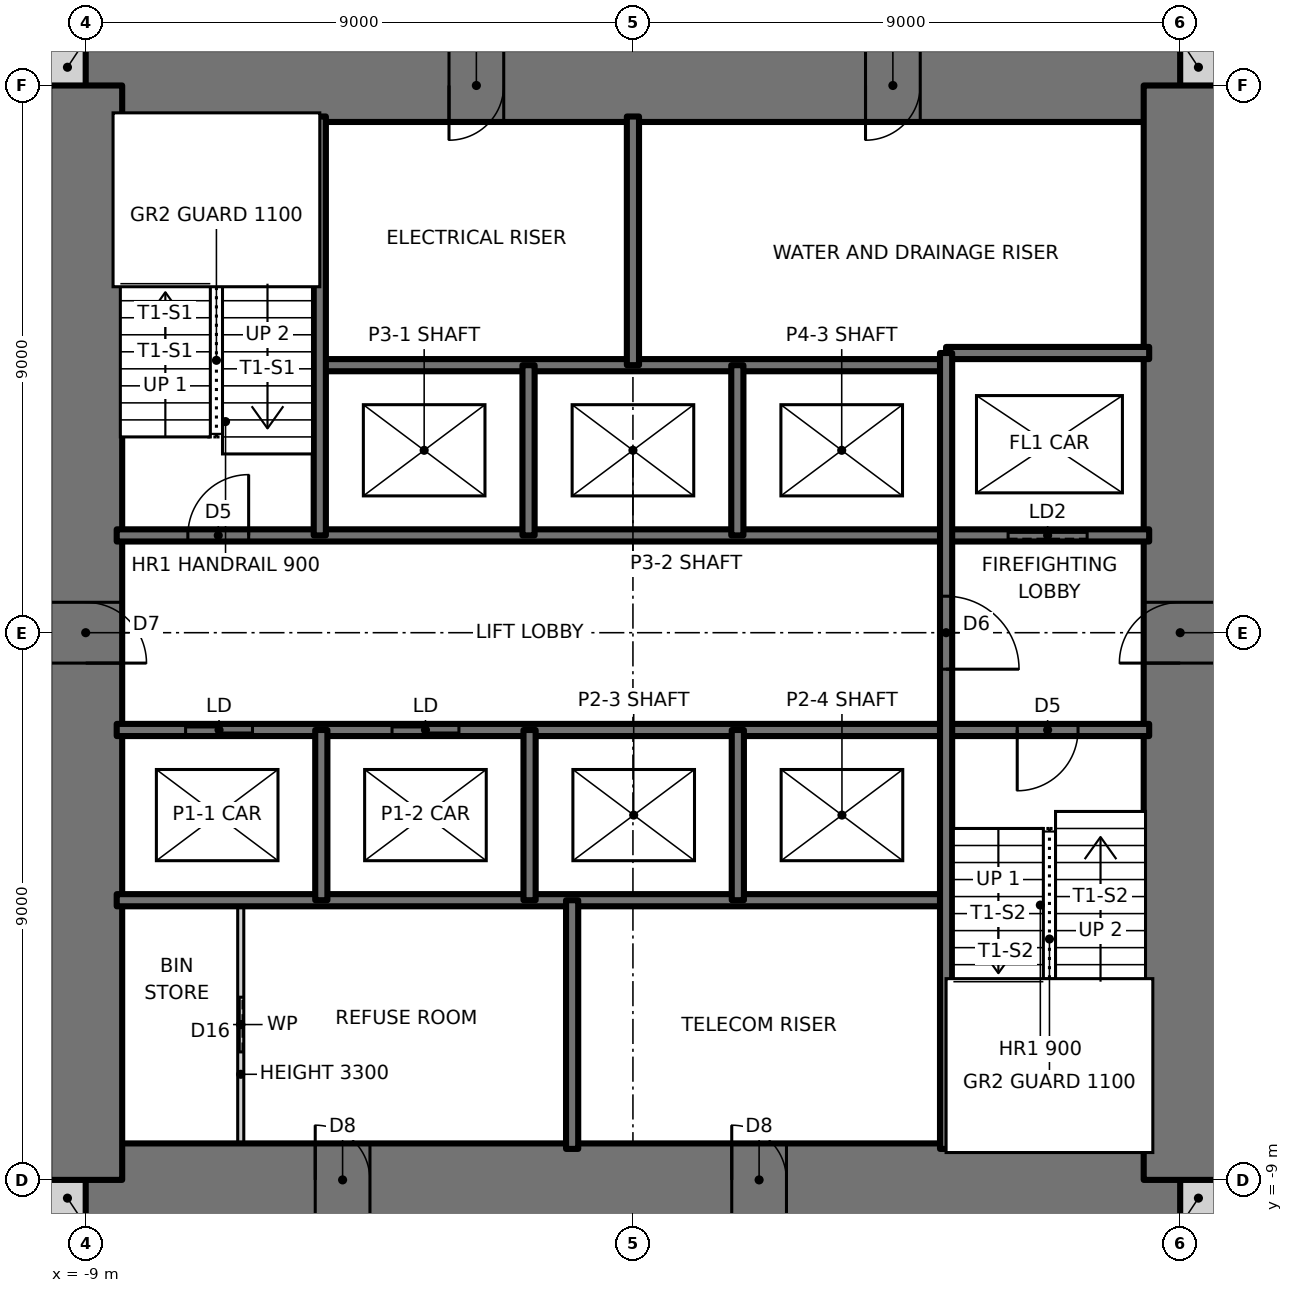
"""IFC4 building model, lengths in metres.
Left out: names, types, materials, properties, quantities, classifications, styles, units other than length and angle.
Written with IfcOpenShell. Run it as: python <this file> out.ifc"""

import sys

from ifc_helpers import new_model, si_unit, direction, frame, frame_2d, origin, place, context, subcontext, project, spatial, rectangle, extrude, element, fill, save


model = new_model("IFC4")
c1 = context("Model", 3, precision=1e-05, world=origin(), true_north=direction((0.0, 1.0)))
c2 = subcontext(c1, "Body", "Model", "MODEL_VIEW")
j1 = project(units=[si_unit("LENGTHUNIT", "METRE"), si_unit("PLANEANGLEUNIT", "RADIAN")], contexts=[c1])
p1 = place(None, origin())
s1 = spatial("IfcSite", under=j1, at=p1, CompositionType="ELEMENT")
p2 = place(p1, origin())
s2 = spatial("IfcBuilding", under=s1, at=p2, CompositionType="ELEMENT")
p3 = place(p2, frame((0.0, 0.0, 22.0)))
s3 = spatial("IfcBuildingStorey", under=s2, at=p3, CompositionType="ELEMENT", Elevation=22.0)
for number, where, z_axis, x_axis in (
    (1, (-9.6, -9.3, 0.0), (0.0, 0.0, 1.0), (1.0, 0.0, 0.0)),
    (2, (9.0, -9.3, 0.0), (0.0, 0.0, 1.0), (1.0, 0.0, 0.0)),
    (3, (9.0, 9.3, 0.0), (0.0, 0.0, 1.0), (1.0, 0.0, 0.0)),
    (4, (-9.6, 9.3, 0.0), (0.0, 0.0, 1.0), (1.0, 0.0, 0.0)),
):
    element("IfcWall", number, at=place(p3, frame(where, z_axis=z_axis, x_axis=x_axis)), inside=s3, PredefinedType="SOLIDWALL", context=c2, shape_type="SweptSolid", body=[
        extrude(rectangle(XDim=0.6, YDim=0.6, at=frame_2d((0.3, 0.0))), origin(), (0.0, 0.0, 1.0), 3.5),
    ])
p4 = place(p3, frame((-9.0, -9.0, 0.0), z_axis=(0.0, 0.0, 1.0), x_axis=(1.0, 0.0, 0.0)))
e5 = element("IfcWall", 5, at=p4, inside=s3, PredefinedType="SHEAR", context=c2, shape_type="SweptSolid", body=[
    extrude(rectangle(XDim=18.0, YDim=1.2, at=frame_2d((9.0, 0.0))), origin(), (0.0, 0.0, 1.0), 3.5),
])
p5 = place(p4, frame((3.775, 0.0, 0.0)))
e6 = element("IfcOpeningElement", 6, at=p5, cuts=e5, PredefinedType="OPENING", context=c2, shape_type="SweptSolid", body=[
    extrude(rectangle(XDim=0.9, YDim=2.1, at=frame_2d((0.45, 1.05))), frame((0.0, 0.61, 0.0), z_axis=(0.0, -1.0, 0.0), x_axis=(1.0, 0.0, 0.0)), (0.0, 0.0, 1.0), 1.22),
])
p6 = place(p4, frame((10.625, 0.0, 0.0)))
e7 = element("IfcOpeningElement", 7, at=p6, cuts=e5, PredefinedType="OPENING", context=c2, shape_type="SweptSolid", body=[
    extrude(rectangle(XDim=0.9, YDim=2.1, at=frame_2d((0.45, 1.05))), frame((0.0, 0.61, 0.0), z_axis=(0.0, -1.0, 0.0), x_axis=(1.0, 0.0, 0.0)), (0.0, 0.0, 1.0), 1.22),
])
p7 = place(p3, frame((9.0, 9.0, 0.0), z_axis=(0.0, 0.0, 1.0), x_axis=(-1.0, 0.0, 0.0)))
e8 = element("IfcWall", 8, at=p7, inside=s3, PredefinedType="SHEAR", context=c2, shape_type="SweptSolid", body=[
    extrude(rectangle(XDim=18.0, YDim=1.2, at=frame_2d((9.0, 0.0))), origin(), (0.0, 0.0, 1.0), 3.5),
])
p8 = place(p7, frame((11.125, 0.0, 0.0)))
e9 = element("IfcOpeningElement", 9, at=p8, cuts=e8, PredefinedType="OPENING", context=c2, shape_type="SweptSolid", body=[
    extrude(rectangle(XDim=0.9, YDim=2.1, at=frame_2d((0.45, 1.05))), frame((0.0, 0.61, 0.0), z_axis=(0.0, -1.0, 0.0), x_axis=(1.0, 0.0, 0.0)), (0.0, 0.0, 1.0), 1.22),
])
p9 = place(p7, frame((4.275, 0.0, 0.0)))
e10 = element("IfcOpeningElement", 10, at=p9, cuts=e8, PredefinedType="OPENING", context=c2, shape_type="SweptSolid", body=[
    extrude(rectangle(XDim=0.9, YDim=2.1, at=frame_2d((0.45, 1.05))), frame((0.0, 0.61, 0.0), z_axis=(0.0, -1.0, 0.0), x_axis=(1.0, 0.0, 0.0)), (0.0, 0.0, 1.0), 1.22),
])
p10 = place(p3, frame((9.0, -9.0, 0.0), z_axis=(0.0, 0.0, 1.0), x_axis=(0.0, 1.0, 0.0)))
e11 = element("IfcWall", 11, at=p10, inside=s3, PredefinedType="SHEAR", context=c2, shape_type="SweptSolid", body=[
    extrude(rectangle(XDim=18.0, YDim=1.2, at=frame_2d((9.0, 0.0))), origin(), (0.0, 0.0, 1.0), 3.5),
])
p11 = place(p10, frame((8.5, 0.0, 0.0)))
e12 = element("IfcOpeningElement", 12, at=p11, cuts=e11, PredefinedType="OPENING", context=c2, shape_type="SweptSolid", body=[
    extrude(rectangle(XDim=1.0, YDim=2.1, at=frame_2d((0.5, 1.05))), frame((0.0, 0.61, 0.0), z_axis=(0.0, -1.0, 0.0), x_axis=(1.0, 0.0, 0.0)), (0.0, 0.0, 1.0), 1.22),
])
p12 = place(p3, frame((-9.0, 9.0, 0.0), z_axis=(0.0, 0.0, 1.0), x_axis=(0.0, -1.0, 0.0)))
e13 = element("IfcWall", 13, at=p12, inside=s3, PredefinedType="SHEAR", context=c2, shape_type="SweptSolid", body=[
    extrude(rectangle(XDim=18.0, YDim=1.2, at=frame_2d((9.0, 0.0))), origin(), (0.0, 0.0, 1.0), 3.5),
])
p13 = place(p12, frame((8.5, 0.0, 0.0)))
e14 = element("IfcOpeningElement", 14, at=p13, cuts=e13, PredefinedType="OPENING", context=c2, shape_type="SweptSolid", body=[
    extrude(rectangle(XDim=1.0, YDim=2.1, at=frame_2d((0.5, 1.05))), frame((0.0, 0.61, 0.0), z_axis=(0.0, -1.0, 0.0), x_axis=(1.0, 0.0, 0.0)), (0.0, 0.0, 1.0), 1.22),
])
p14 = place(p3, frame((-8.49, -4.4, 0.0), z_axis=(0.0, 0.0, 1.0), x_axis=(1.0, 0.0, 0.0)))
e15 = element("IfcWall", 15, at=p14, inside=s3, PredefinedType="SOLIDWALL", context=c2, shape_type="SweptSolid", body=[
    extrude(rectangle(XDim=13.64, YDim=0.2, at=frame_2d((6.82, 0.0))), origin(), (0.0, 0.0, 1.0), 3.5),
])
p15 = place(p3, frame((-8.49, -1.6, 0.0), z_axis=(0.0, 0.0, 1.0), x_axis=(1.0, 0.0, 0.0)))
e16 = element("IfcWall", 16, at=p15, inside=s3, PredefinedType="SOLIDWALL", context=c2, shape_type="SweptSolid", body=[
    extrude(rectangle(XDim=16.98, YDim=0.2, at=frame_2d((8.49, 0.0))), origin(), (0.0, 0.0, 1.0), 3.5),
])
p16 = place(p15, frame((14.81, 0.0, 0.0)))
e17 = element("IfcOpeningElement", 17, at=p16, cuts=e16, PredefinedType="OPENING", context=c2, shape_type="SweptSolid", body=[
    extrude(rectangle(XDim=1.0, YDim=2.1, at=frame_2d((0.5, 1.05))), frame((0.0, 0.11, 0.0), z_axis=(0.0, -1.0, 0.0), x_axis=(1.0, 0.0, 0.0)), (0.0, 0.0, 1.0), 0.22),
])
p17 = place(p15, frame((1.133, 0.0, 0.0)))
e18 = element("IfcOpeningElement", 18, at=p17, cuts=e16, PredefinedType="OPENING", context=c2, shape_type="SweptSolid", body=[
    extrude(rectangle(XDim=1.1, YDim=2.1, at=frame_2d((0.55, 1.05))), frame((0.0, 0.11, 0.0), z_axis=(0.0, -1.0, 0.0), x_axis=(1.0, 0.0, 0.0)), (0.0, 0.0, 1.0), 0.22),
])
p18 = place(p15, frame((4.528, 0.0, 0.0)))
e19 = element("IfcOpeningElement", 19, at=p18, cuts=e16, PredefinedType="OPENING", context=c2, shape_type="SweptSolid", body=[
    extrude(rectangle(XDim=1.1, YDim=2.1, at=frame_2d((0.55, 1.05))), frame((0.0, 0.11, 0.0), z_axis=(0.0, -1.0, 0.0), x_axis=(1.0, 0.0, 0.0)), (0.0, 0.0, 1.0), 0.22),
])
p19 = place(p3, frame((-8.49, 1.6, 0.0), z_axis=(0.0, 0.0, 1.0), x_axis=(1.0, 0.0, 0.0)))
e20 = element("IfcWall", 20, at=p19, inside=s3, PredefinedType="SOLIDWALL", context=c2, shape_type="SweptSolid", body=[
    extrude(rectangle(XDim=16.98, YDim=0.2, at=frame_2d((8.49, 0.0))), origin(), (0.0, 0.0, 1.0), 3.5),
])
p20 = place(p19, frame((1.17, 0.0, 0.0)))
e21 = element("IfcOpeningElement", 21, at=p20, cuts=e20, PredefinedType="OPENING", context=c2, shape_type="SweptSolid", body=[
    extrude(rectangle(XDim=1.0, YDim=2.1, at=frame_2d((0.5, 1.05))), frame((0.0, 0.11, 0.0), z_axis=(0.0, -1.0, 0.0), x_axis=(1.0, 0.0, 0.0)), (0.0, 0.0, 1.0), 0.22),
])
p21 = place(p19, frame((14.66, 0.0, 0.0)))
e22 = element("IfcOpeningElement", 22, at=p21, cuts=e20, PredefinedType="OPENING", context=c2, shape_type="SweptSolid", body=[
    extrude(rectangle(XDim=1.3, YDim=2.1, at=frame_2d((0.65, 1.05))), frame((0.0, 0.11, 0.0), z_axis=(0.0, -1.0, 0.0), x_axis=(1.0, 0.0, 0.0)), (0.0, 0.0, 1.0), 0.22),
])
p22 = place(p3, frame((-5.15, 4.4, 0.0), z_axis=(0.0, 0.0, 1.0), x_axis=(1.0, 0.0, 0.0)))
e23 = element("IfcWall", 23, at=p22, inside=s3, PredefinedType="SOLIDWALL", context=c2, shape_type="SweptSolid", body=[
    extrude(rectangle(XDim=10.3, YDim=0.2, at=frame_2d((5.15, 0.0))), origin(), (0.0, 0.0, 1.0), 3.5),
])
p23 = place(p3, frame((5.15, 4.6, 0.0), z_axis=(0.0, 0.0, 1.0), x_axis=(1.0, 0.0, 0.0)))
e24 = element("IfcWall", 24, at=p23, inside=s3, PredefinedType="SOLIDWALL", context=c2, shape_type="SweptSolid", body=[
    extrude(rectangle(XDim=3.34, YDim=0.2, at=frame_2d((1.67, 0.0))), origin(), (0.0, 0.0, 1.0), 3.5),
])
p24 = place(p3, frame((5.15, -8.49, 0.0), z_axis=(0.0, 0.0, 1.0), x_axis=(0.0, 1.0, 0.0)))
e25 = element("IfcWall", 25, at=p24, inside=s3, PredefinedType="SOLIDWALL", context=c2, shape_type="SweptSolid", body=[
    extrude(rectangle(XDim=13.09, YDim=0.2, at=frame_2d((6.545, 0.0))), origin(), (0.0, 0.0, 1.0), 3.5),
])
p25 = place(p24, frame((7.89, 0.0, 0.0)))
e26 = element("IfcOpeningElement", 26, at=p25, cuts=e25, PredefinedType="OPENING", context=c2, shape_type="SweptSolid", body=[
    extrude(rectangle(XDim=1.2, YDim=2.1, at=frame_2d((0.6, 1.05))), frame((0.0, 0.11, 0.0), z_axis=(0.0, -1.0, 0.0), x_axis=(1.0, 0.0, 0.0)), (0.0, 0.0, 1.0), 0.22),
])
for number, where, z_axis, x_axis in (
    (27, (1.725, -4.4, 0.0), (0.0, 0.0, 1.0), (0.0, 1.0, 0.0)),
    (28, (1.717, 1.6, 0.0), (0.0, 0.0, 1.0), (0.0, 1.0, 0.0)),
):
    element("IfcWall", number, at=place(p3, frame(where, z_axis=z_axis, x_axis=x_axis)), inside=s3, PredefinedType="SOLIDWALL", context=c2, shape_type="SweptSolid", body=[
        extrude(rectangle(XDim=2.8, YDim=0.2, at=frame_2d((1.4, 0.0))), origin(), (0.0, 0.0, 1.0), 3.5),
    ])
for number, where, z_axis, x_axis in (
    (29, (0.0, 4.4, 0.0), (0.0, 0.0, 1.0), (0.0, 1.0, 0.0)),
    (30, (-1.0, -8.49, 0.0), (0.0, 0.0, 1.0), (0.0, 1.0, 0.0)),
):
    element("IfcWall", number, at=place(p3, frame(where, z_axis=z_axis, x_axis=x_axis)), inside=s3, PredefinedType="SOLIDWALL", context=c2, shape_type="SweptSolid", body=[
        extrude(rectangle(XDim=4.09, YDim=0.2, at=frame_2d((2.045, 0.0))), origin(), (0.0, 0.0, 1.0), 3.5),
    ])
for number, where, z_axis, x_axis in (
    (31, (-1.7, -4.4, 0.0), (0.0, 0.0, 1.0), (0.0, 1.0, 0.0)),
    (32, (-1.717, 1.6, 0.0), (0.0, 0.0, 1.0), (0.0, 1.0, 0.0)),
    (33, (-5.125, -4.4, 0.0), (0.0, 0.0, 1.0), (0.0, 1.0, 0.0)),
):
    element("IfcWall", number, at=place(p3, frame(where, z_axis=z_axis, x_axis=x_axis)), inside=s3, PredefinedType="SOLIDWALL", context=c2, shape_type="SweptSolid", body=[
        extrude(rectangle(XDim=2.8, YDim=0.2, at=frame_2d((1.4, 0.0))), origin(), (0.0, 0.0, 1.0), 3.5),
    ])
p26 = place(p3, frame((-5.15, 1.6, 0.0), z_axis=(0.0, 0.0, 1.0), x_axis=(0.0, 1.0, 0.0)))
e34 = element("IfcWall", 34, at=p26, inside=s3, PredefinedType="SOLIDWALL", context=c2, shape_type="SweptSolid", body=[
    extrude(rectangle(XDim=6.89, YDim=0.2, at=frame_2d((3.445, 0.0))), origin(), (0.0, 0.0, 1.0), 3.5),
])
p27 = place(p3, frame((-6.45, -8.49, 0.0), z_axis=(0.0, 0.0, 1.0), x_axis=(0.0, 1.0, 0.0)))
e35 = element("IfcWall", 35, at=p27, inside=s3, PredefinedType="PARTITIONING", context=c2, shape_type="SweptSolid", body=[
    extrude(rectangle(XDim=4.09, YDim=0.1, at=frame_2d((2.045, 0.0))), origin(), (0.0, 0.0, 1.0), 3.3),
])
p28 = place(p27, frame((1.595, 0.0, 0.0)))
e36 = element("IfcOpeningElement", 36, at=p28, cuts=e35, PredefinedType="OPENING", context=c2, shape_type="SweptSolid", body=[
    extrude(rectangle(XDim=0.9, YDim=2.1, at=frame_2d((0.45, 1.05))), frame((0.0, 0.06, 0.0), z_axis=(0.0, -1.0, 0.0), x_axis=(1.0, 0.0, 0.0)), (0.0, 0.0, 1.0), 0.12),
])
p29 = place(p20, origin())
e37 = element("IfcDoor", 37, at=p29, inside=s3, OperationType="SINGLE_SWING_RIGHT", PredefinedType="DOOR", context=c2, shape_type="SweptSolid", body=[
    extrude(rectangle(XDim=1.0, YDim=2.1, at=frame_2d((0.5, 1.05))), frame((0.0, 0.025, 0.0), z_axis=(0.0, -1.0, 0.0), x_axis=(1.0, 0.0, 0.0)), (0.0, 0.0, 1.0), 0.05),
])
fill(e21, e37)
p30 = place(p16, frame((1.0, 0.0, 0.0), z_axis=(0.0, 0.0, 1.0), x_axis=(-1.0, 0.0, 0.0)))
e38 = element("IfcDoor", 38, at=p30, inside=s3, OperationType="SINGLE_SWING_RIGHT", PredefinedType="DOOR", context=c2, shape_type="SweptSolid", body=[
    extrude(rectangle(XDim=1.0, YDim=2.1, at=frame_2d((0.5, 1.05))), frame((0.0, 0.025, 0.0), z_axis=(0.0, -1.0, 0.0), x_axis=(1.0, 0.0, 0.0)), (0.0, 0.0, 1.0), 0.05),
])
fill(e17, e38)
p31 = place(p25, frame((1.2, 0.0, 0.0), z_axis=(0.0, 0.0, 1.0), x_axis=(-1.0, 0.0, 0.0)))
e39 = element("IfcDoor", 39, at=p31, inside=s3, OperationType="SINGLE_SWING_RIGHT", PredefinedType="DOOR", context=c2, shape_type="SweptSolid", body=[
    extrude(rectangle(XDim=1.2, YDim=2.1, at=frame_2d((0.6, 1.05))), frame((0.0, 0.025, 0.0), z_axis=(0.0, -1.0, 0.0), x_axis=(1.0, 0.0, 0.0)), (0.0, 0.0, 1.0), 0.05),
])
fill(e26, e39)
p32 = place(p28, origin())
e40 = element("IfcDoor", 40, at=p32, inside=s3, OperationType="SLIDING_TO_LEFT", PredefinedType="DOOR", context=c2, shape_type="SweptSolid", body=[
    extrude(rectangle(XDim=0.9, YDim=2.1, at=frame_2d((0.45, 1.05))), frame((0.0, 0.025, 0.0), z_axis=(0.0, -1.0, 0.0), x_axis=(1.0, 0.0, 0.0)), (0.0, 0.0, 1.0), 0.05),
])
fill(e36, e40)
p33 = place(p13, origin())
e41 = element("IfcDoor", 41, at=p33, inside=s3, OperationType="SINGLE_SWING_RIGHT", PredefinedType="DOOR", context=c2, shape_type="SweptSolid", body=[
    extrude(rectangle(XDim=1.0, YDim=2.1, at=frame_2d((0.5, 1.05))), frame((0.0, 0.025, 0.0), z_axis=(0.0, -1.0, 0.0), x_axis=(1.0, 0.0, 0.0)), (0.0, 0.0, 1.0), 0.05),
])
fill(e14, e41)
p34 = place(p11, origin())
e42 = element("IfcDoor", 42, at=p34, inside=s3, OperationType="SINGLE_SWING_LEFT", PredefinedType="DOOR", context=c2, shape_type="SweptSolid", body=[
    extrude(rectangle(XDim=1.0, YDim=2.1, at=frame_2d((0.5, 1.05))), frame((0.0, 0.025, 0.0), z_axis=(0.0, -1.0, 0.0), x_axis=(1.0, 0.0, 0.0)), (0.0, 0.0, 1.0), 0.05),
])
fill(e12, e42)
p35 = place(p8, origin())
e43 = element("IfcDoor", 43, at=p35, inside=s3, OperationType="SINGLE_SWING_RIGHT", PredefinedType="DOOR", context=c2, shape_type="SweptSolid", body=[
    extrude(rectangle(XDim=0.9, YDim=2.1, at=frame_2d((0.45, 1.05))), frame((0.0, 0.025, 0.0), z_axis=(0.0, -1.0, 0.0), x_axis=(1.0, 0.0, 0.0)), (0.0, 0.0, 1.0), 0.05),
])
fill(e9, e43)
p36 = place(p9, origin())
e44 = element("IfcDoor", 44, at=p36, inside=s3, OperationType="SINGLE_SWING_RIGHT", PredefinedType="DOOR", context=c2, shape_type="SweptSolid", body=[
    extrude(rectangle(XDim=0.9, YDim=2.1, at=frame_2d((0.45, 1.05))), frame((0.0, 0.025, 0.0), z_axis=(0.0, -1.0, 0.0), x_axis=(1.0, 0.0, 0.0)), (0.0, 0.0, 1.0), 0.05),
])
fill(e10, e44)
p37 = place(p5, origin())
e45 = element("IfcDoor", 45, at=p37, inside=s3, OperationType="SINGLE_SWING_LEFT", PredefinedType="DOOR", context=c2, shape_type="SweptSolid", body=[
    extrude(rectangle(XDim=0.9, YDim=2.1, at=frame_2d((0.45, 1.05))), frame((0.0, 0.025, 0.0), z_axis=(0.0, -1.0, 0.0), x_axis=(1.0, 0.0, 0.0)), (0.0, 0.0, 1.0), 0.05),
])
fill(e6, e45)
p38 = place(p6, origin())
e46 = element("IfcDoor", 46, at=p38, inside=s3, OperationType="SINGLE_SWING_LEFT", PredefinedType="DOOR", context=c2, shape_type="SweptSolid", body=[
    extrude(rectangle(XDim=0.9, YDim=2.1, at=frame_2d((0.45, 1.05))), frame((0.0, 0.025, 0.0), z_axis=(0.0, -1.0, 0.0), x_axis=(1.0, 0.0, 0.0)), (0.0, 0.0, 1.0), 0.05),
])
fill(e7, e46)
p39 = place(p17, origin())
e47 = element("IfcDoor", 47, at=p39, inside=s3, OperationType="DOUBLE_DOOR_SLIDING", PredefinedType="DOOR", context=c2, shape_type="SweptSolid", body=[
    extrude(rectangle(XDim=1.1, YDim=2.1, at=frame_2d((0.55, 1.05))), frame((0.0, 0.025, 0.0), z_axis=(0.0, -1.0, 0.0), x_axis=(1.0, 0.0, 0.0)), (0.0, 0.0, 1.0), 0.05),
])
fill(e18, e47)
p40 = place(p18, origin())
e48 = element("IfcDoor", 48, at=p40, inside=s3, OperationType="DOUBLE_DOOR_SLIDING", PredefinedType="DOOR", context=c2, shape_type="SweptSolid", body=[
    extrude(rectangle(XDim=1.1, YDim=2.1, at=frame_2d((0.55, 1.05))), frame((0.0, 0.025, 0.0), z_axis=(0.0, -1.0, 0.0), x_axis=(1.0, 0.0, 0.0)), (0.0, 0.0, 1.0), 0.05),
])
fill(e19, e48)
p41 = place(p21, origin())
e49 = element("IfcDoor", 49, at=p41, inside=s3, OperationType="SLIDING_TO_LEFT", PredefinedType="DOOR", context=c2, shape_type="SweptSolid", body=[
    extrude(rectangle(XDim=1.3, YDim=2.1, at=frame_2d((0.65, 1.05))), frame((0.0, 0.025, 0.0), z_axis=(0.0, -1.0, 0.0), x_axis=(1.0, 0.0, 0.0)), (0.0, 0.0, 1.0), 0.05),
])
fill(e22, e49)
save(model, sys.argv[1])
